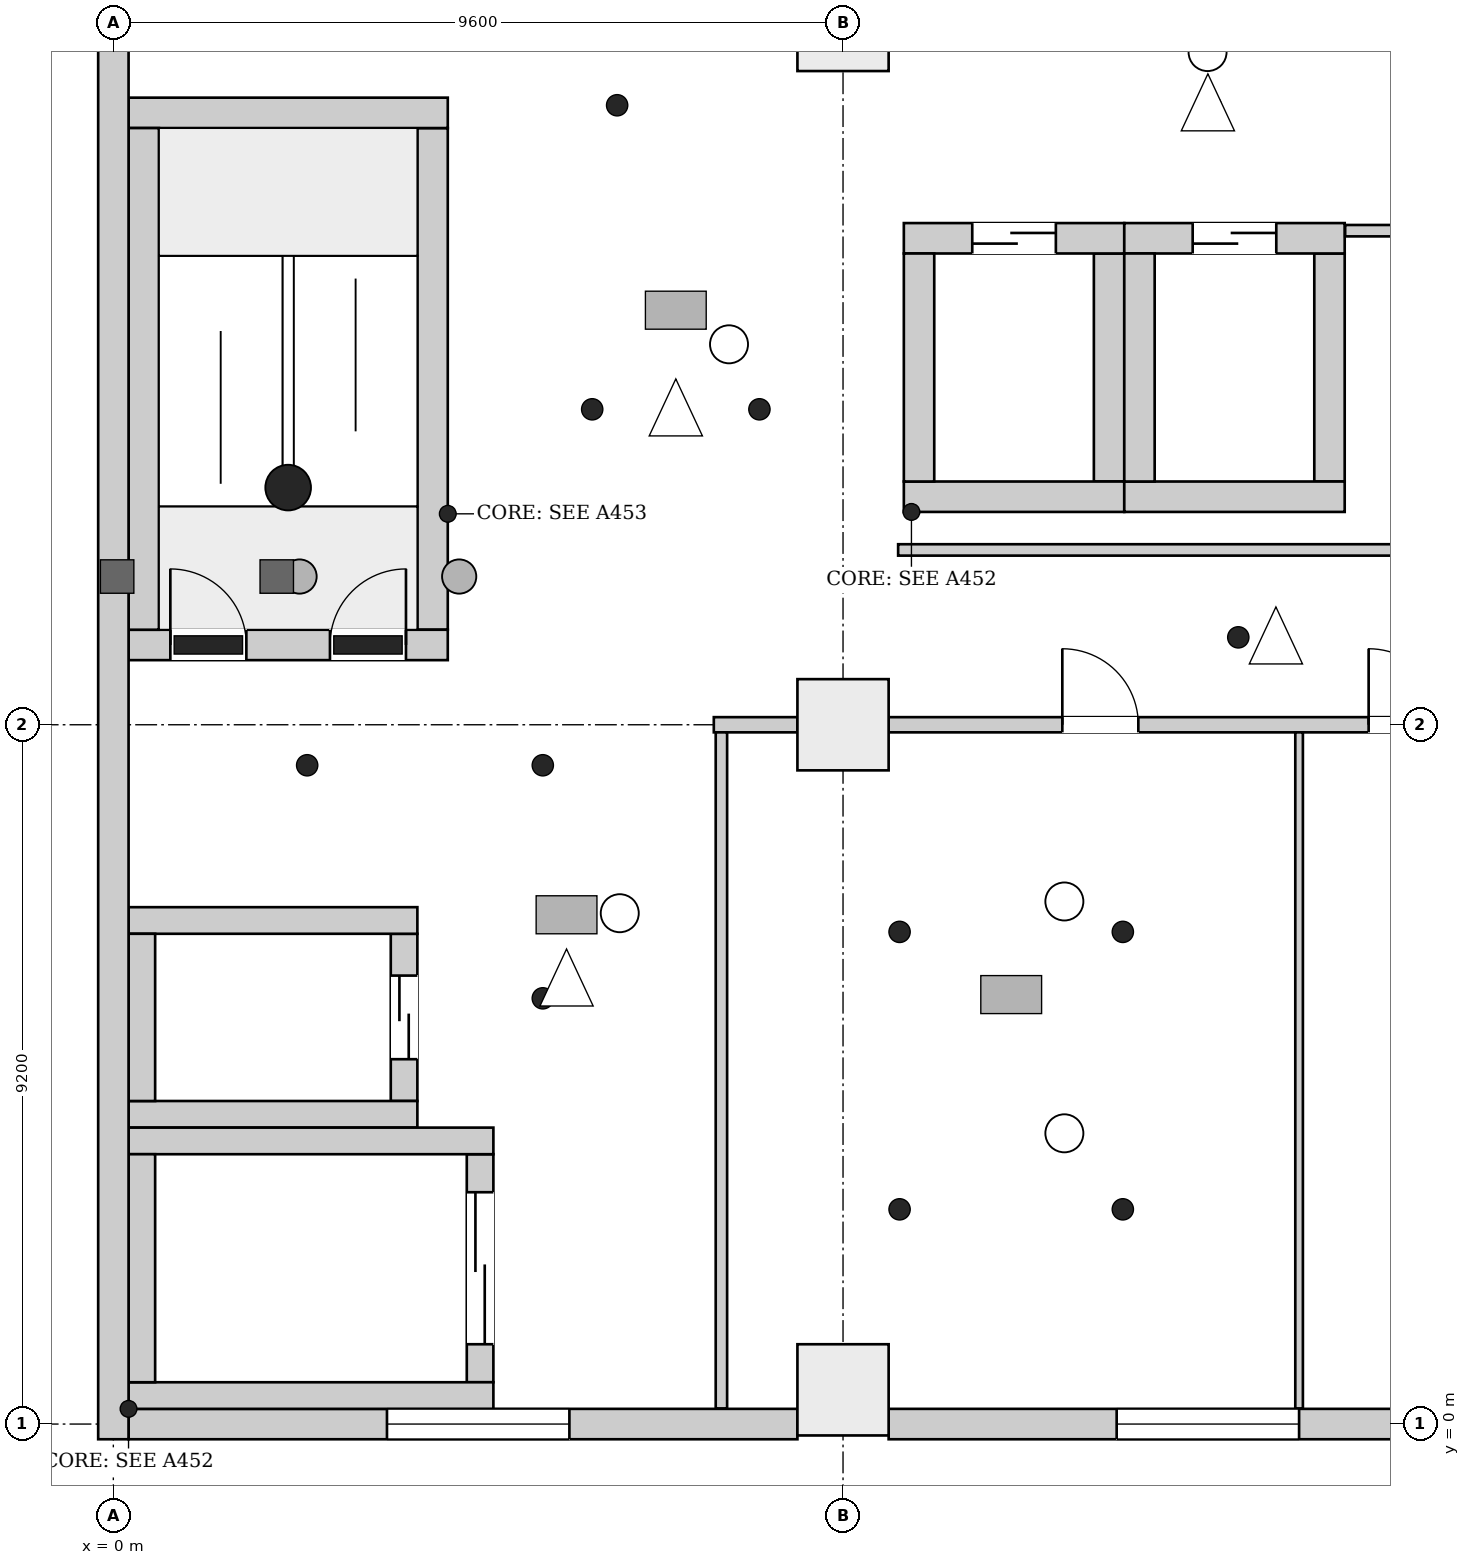
"""IFC4 building model, lengths in metres.
Left out: names, types, materials, properties, quantities, classifications, styles, units other than length and angle.
Written with IfcOpenShell. Run it as: python <this file> out.ifc"""

import sys

from ifc_helpers import new_model, si_unit, direction, frame, frame_2d, origin, origin_2d, place, context, subcontext, project, spatial, rectangle, extrude, element, fill, save


model = new_model("IFC4")
c1 = context("Model", 3, precision=1e-05, world=origin(), true_north=direction((0.0, 1.0)))
c2 = subcontext(c1, "Body", "Model", "MODEL_VIEW")
j1 = project(units=[si_unit("LENGTHUNIT", "METRE"), si_unit("PLANEANGLEUNIT", "RADIAN")], contexts=[c1])
p1 = place(None, origin())
s1 = spatial("IfcSite", under=j1, at=p1, CompositionType="ELEMENT")
p2 = place(p1, origin())
s2 = spatial("IfcBuilding", under=s1, at=p2, CompositionType="ELEMENT")
p3 = place(p2, frame((0.0, 0.0, 14.2)))
s3 = spatial("IfcBuildingStorey", under=s2, at=p3, CompositionType="ELEMENT", Elevation=14.2)
p4 = place(p3, frame((0.0, -0.2, 0.0), z_axis=(0.0, 0.0, 1.0), x_axis=(0.0, 1.0, 0.0)))
e1 = element("IfcWall", 1, at=p4, inside=s3, PredefinedType="SHEAR", context=c2, shape_type="SweptSolid", body=[
    extrude(rectangle(XDim=46.88, YDim=0.4, at=frame_2d((23.44, 0.0))), origin(), (0.0, 0.0, 1.0), 7.5),
])
p5 = place(p3, frame((0.2, 10.25, 0.0), z_axis=(0.0, 0.0, 1.0), x_axis=(1.0, 0.0, 0.0)))
e2 = element("IfcWall", 2, at=p5, inside=s3, PredefinedType="SHEAR", context=c2, shape_type="SweptSolid", body=[
    extrude(rectangle(XDim=4.2, YDim=0.4, at=frame_2d((2.1, 0.0))), origin(), (0.0, 0.0, 1.0), 7.5),
])
p6 = place(p5, frame((0.55, 0.0, 0.0)))
e3 = element("IfcOpeningElement", 3, at=p6, cuts=e2, PredefinedType="OPENING", context=c2, shape_type="SweptSolid", body=[
    extrude(rectangle(XDim=1.0, YDim=2.1, at=frame_2d((0.5, 1.05))), frame((0.0, 0.21, 0.0), z_axis=(0.0, -1.0, 0.0), x_axis=(1.0, 0.0, 0.0)), (0.0, 0.0, 1.0), 0.42),
])
p7 = place(p5, frame((2.65, 0.0, 0.0)))
e4 = element("IfcOpeningElement", 4, at=p7, cuts=e2, PredefinedType="OPENING", context=c2, shape_type="SweptSolid", body=[
    extrude(rectangle(XDim=1.0, YDim=2.1, at=frame_2d((0.5, 1.05))), frame((0.0, 0.21, 0.0), z_axis=(0.0, -1.0, 0.0), x_axis=(1.0, 0.0, 0.0)), (0.0, 0.0, 1.0), 0.42),
])
p8 = place(p3, frame((0.2, 17.25, 0.0), z_axis=(0.0, 0.0, 1.0), x_axis=(1.0, 0.0, 0.0)))
e5 = element("IfcWall", 5, at=p8, inside=s3, PredefinedType="SHEAR", context=c2, shape_type="SweptSolid", body=[
    extrude(rectangle(XDim=4.2, YDim=0.4, at=frame_2d((2.1, 0.0))), origin(), (0.0, 0.0, 1.0), 7.5),
])
for number, where, z_axis, x_axis in (
    (6, (0.4, 10.45, 0.0), (0.0, 0.0, 1.0), (0.0, 1.0, 0.0)),
    (7, (4.2, 10.45, 0.0), (0.0, 0.0, 1.0), (0.0, 1.0, 0.0)),
):
    element("IfcWall", number, at=place(p3, frame(where, z_axis=z_axis, x_axis=x_axis)), inside=s3, PredefinedType="SHEAR", context=c2, shape_type="SweptSolid", body=[
        extrude(rectangle(XDim=6.6, YDim=0.4, at=frame_2d((3.3, 0.0))), origin(), (0.0, 0.0, 1.0), 7.5),
    ])
for number, where, z_axis, x_axis in (
    (8, (0.2, 0.375, 0.0), (0.0, 0.0, 1.0), (1.0, 0.0, 0.0)),
    (9, (0.2, 3.725, 0.0), (0.0, 0.0, 1.0), (1.0, 0.0, 0.0)),
):
    element("IfcWall", number, at=place(p3, frame(where, z_axis=z_axis, x_axis=x_axis)), inside=s3, PredefinedType="SHEAR", context=c2, shape_type="SweptSolid", body=[
        extrude(rectangle(XDim=4.8, YDim=0.35, at=frame_2d((2.4, 0.0))), origin(), (0.0, 0.0, 1.0), 7.5),
    ])
p9 = place(p3, frame((0.375, 0.55, 0.0), z_axis=(0.0, 0.0, 1.0), x_axis=(0.0, 1.0, 0.0)))
e10 = element("IfcWall", 10, at=p9, inside=s3, PredefinedType="SHEAR", context=c2, shape_type="SweptSolid", body=[
    extrude(rectangle(XDim=3.0, YDim=0.35, at=frame_2d((1.5, 0.0))), origin(), (0.0, 0.0, 1.0), 7.5),
])
p10 = place(p3, frame((4.825, 0.55, 0.0), z_axis=(0.0, 0.0, 1.0), x_axis=(0.0, 1.0, 0.0)))
e11 = element("IfcWall", 11, at=p10, inside=s3, PredefinedType="SHEAR", context=c2, shape_type="SweptSolid", body=[
    extrude(rectangle(XDim=3.0, YDim=0.35, at=frame_2d((1.5, 0.0))), origin(), (0.0, 0.0, 1.0), 7.5),
])
p11 = place(p10, frame((0.5, 0.0, 0.0)))
e12 = element("IfcOpeningElement", 12, at=p11, cuts=e11, PredefinedType="OPENING", context=c2, shape_type="SweptSolid", body=[
    extrude(rectangle(XDim=2.0, YDim=2.4, at=frame_2d((1.0, 1.2))), frame((0.0, 0.185, 0.0), z_axis=(0.0, -1.0, 0.0), x_axis=(1.0, 0.0, 0.0)), (0.0, 0.0, 1.0), 0.37),
])
for number, where, z_axis, x_axis in (
    (13, (0.2, 4.075, 0.0), (0.0, 0.0, 1.0), (1.0, 0.0, 0.0)),
    (14, (0.2, 6.625, 0.0), (0.0, 0.0, 1.0), (1.0, 0.0, 0.0)),
):
    element("IfcWall", number, at=place(p3, frame(where, z_axis=z_axis, x_axis=x_axis)), inside=s3, PredefinedType="SHEAR", context=c2, shape_type="SweptSolid", body=[
        extrude(rectangle(XDim=3.8, YDim=0.35, at=frame_2d((1.9, 0.0))), origin(), (0.0, 0.0, 1.0), 7.5),
    ])
p12 = place(p3, frame((0.375, 4.25, 0.0), z_axis=(0.0, 0.0, 1.0), x_axis=(0.0, 1.0, 0.0)))
e15 = element("IfcWall", 15, at=p12, inside=s3, PredefinedType="SHEAR", context=c2, shape_type="SweptSolid", body=[
    extrude(rectangle(XDim=2.2, YDim=0.35, at=frame_2d((1.1, 0.0))), origin(), (0.0, 0.0, 1.0), 7.5),
])
p13 = place(p3, frame((3.825, 4.25, 0.0), z_axis=(0.0, 0.0, 1.0), x_axis=(0.0, 1.0, 0.0)))
e16 = element("IfcWall", 16, at=p13, inside=s3, PredefinedType="SHEAR", context=c2, shape_type="SweptSolid", body=[
    extrude(rectangle(XDim=2.2, YDim=0.35, at=frame_2d((1.1, 0.0))), origin(), (0.0, 0.0, 1.0), 7.5),
])
p14 = place(p13, frame((0.55, 0.0, 0.0)))
e17 = element("IfcOpeningElement", 17, at=p14, cuts=e16, PredefinedType="OPENING", context=c2, shape_type="SweptSolid", body=[
    extrude(rectangle(XDim=1.1, YDim=2.1, at=frame_2d((0.55, 1.05))), frame((0.0, 0.185, 0.0), z_axis=(0.0, -1.0, 0.0), x_axis=(1.0, 0.0, 0.0)), (0.0, 0.0, 1.0), 0.37),
])
p15 = place(p3, frame((10.4, 12.2, 0.0), z_axis=(0.0, 0.0, 1.0), x_axis=(1.0, 0.0, 0.0)))
e18 = element("IfcWall", 18, at=p15, inside=s3, PredefinedType="SHEAR", context=c2, shape_type="SweptSolid", body=[
    extrude(rectangle(XDim=2.9, YDim=0.4, at=frame_2d((1.45, 0.0))), origin(), (0.0, 0.0, 1.0), 7.5),
])
p16 = place(p3, frame((10.4, 15.6, 0.0), z_axis=(0.0, 0.0, 1.0), x_axis=(1.0, 0.0, 0.0)))
e19 = element("IfcWall", 19, at=p16, inside=s3, PredefinedType="SHEAR", context=c2, shape_type="SweptSolid", body=[
    extrude(rectangle(XDim=2.9, YDim=0.4, at=frame_2d((1.45, 0.0))), origin(), (0.0, 0.0, 1.0), 7.5),
])
p17 = place(p16, frame((0.9, 0.0, 0.0)))
e20 = element("IfcOpeningElement", 20, at=p17, cuts=e19, PredefinedType="OPENING", context=c2, shape_type="SweptSolid", body=[
    extrude(rectangle(XDim=1.1, YDim=2.1, at=frame_2d((0.55, 1.05))), frame((0.0, 0.21, 0.0), z_axis=(0.0, -1.0, 0.0), x_axis=(1.0, 0.0, 0.0)), (0.0, 0.0, 1.0), 0.42),
])
for number, where, z_axis, x_axis in (
    (21, (10.6, 12.4, 0.0), (0.0, 0.0, 1.0), (0.0, 1.0, 0.0)),
    (22, (13.1, 12.4, 0.0), (0.0, 0.0, 1.0), (0.0, 1.0, 0.0)),
):
    element("IfcWall", number, at=place(p3, frame(where, z_axis=z_axis, x_axis=x_axis)), inside=s3, PredefinedType="SHEAR", context=c2, shape_type="SweptSolid", body=[
        extrude(rectangle(XDim=3.0, YDim=0.4, at=frame_2d((1.5, 0.0))), origin(), (0.0, 0.0, 1.0), 7.5),
    ])
p18 = place(p3, frame((13.3, 12.2, 0.0), z_axis=(0.0, 0.0, 1.0), x_axis=(1.0, 0.0, 0.0)))
e23 = element("IfcWall", 23, at=p18, inside=s3, PredefinedType="SHEAR", context=c2, shape_type="SweptSolid", body=[
    extrude(rectangle(XDim=2.9, YDim=0.4, at=frame_2d((1.45, 0.0))), origin(), (0.0, 0.0, 1.0), 7.5),
])
p19 = place(p3, frame((13.3, 15.6, 0.0), z_axis=(0.0, 0.0, 1.0), x_axis=(1.0, 0.0, 0.0)))
e24 = element("IfcWall", 24, at=p19, inside=s3, PredefinedType="SHEAR", context=c2, shape_type="SweptSolid", body=[
    extrude(rectangle(XDim=2.9, YDim=0.4, at=frame_2d((1.45, 0.0))), origin(), (0.0, 0.0, 1.0), 7.5),
])
p20 = place(p19, frame((0.9, 0.0, 0.0)))
e25 = element("IfcOpeningElement", 25, at=p20, cuts=e24, PredefinedType="OPENING", context=c2, shape_type="SweptSolid", body=[
    extrude(rectangle(XDim=1.1, YDim=2.1, at=frame_2d((0.55, 1.05))), frame((0.0, 0.21, 0.0), z_axis=(0.0, -1.0, 0.0), x_axis=(1.0, 0.0, 0.0)), (0.0, 0.0, 1.0), 0.42),
])
for number, where, z_axis, x_axis in (
    (26, (13.5, 12.4, 0.0), (0.0, 0.0, 1.0), (0.0, 1.0, 0.0)),
    (27, (16.0, 12.4, 0.0), (0.0, 0.0, 1.0), (0.0, 1.0, 0.0)),
):
    element("IfcWall", number, at=place(p3, frame(where, z_axis=z_axis, x_axis=x_axis)), inside=s3, PredefinedType="SHEAR", context=c2, shape_type="SweptSolid", body=[
        extrude(rectangle(XDim=3.0, YDim=0.4, at=frame_2d((1.5, 0.0))), origin(), (0.0, 0.0, 1.0), 7.5),
    ])
for number, where, z_axis, x_axis in (
    (28, (9.6, 0.45, 0.0), (0.0, 0.0, 1.0), (1.0, 0.0, 0.0)),
    (29, (9.6, 9.2, 0.0), (0.0, 0.0, 1.0), (1.0, 0.0, 0.0)),
    (30, (9.6, 18.4, 0.0), (0.0, 0.0, 1.0), (1.0, 0.0, 0.0)),
):
    element("IfcColumn", number, at=place(p3, frame(where, z_axis=z_axis, x_axis=x_axis)), inside=s3, PredefinedType="COLUMN", context=c2, shape_type="SweptSolid", body=[
        extrude(rectangle(XDim=1.2, YDim=1.2, at=origin_2d()), origin(), (0.0, 0.0, 1.0), 7.5),
    ])
p21 = place(p3, frame((0.2, 0.0, 0.0), z_axis=(0.0, 0.0, 1.0), x_axis=(1.0, 0.0, 0.0)))
e31 = element("IfcWall", 31, at=p21, inside=s3, PredefinedType="ELEMENTEDWALL", context=c2, shape_type="SweptSolid", body=[
    extrude(rectangle(XDim=8.8, YDim=0.4, at=frame_2d((4.4, 0.0))), origin(), (0.0, 0.0, 1.0), 7.15),
])
p22 = place(p21, frame((3.4, 0.0, 1.0)))
e32 = element("IfcOpeningElement", 32, at=p22, cuts=e31, PredefinedType="OPENING", context=c2, shape_type="SweptSolid", body=[
    extrude(rectangle(XDim=2.4, YDim=2.2, at=frame_2d((1.2, 1.1))), frame((0.0, 0.21, 0.0), z_axis=(0.0, -1.0, 0.0), x_axis=(1.0, 0.0, 0.0)), (0.0, 0.0, 1.0), 0.42),
])
p23 = place(p3, frame((10.2, 0.0, 0.0), z_axis=(0.0, 0.0, 1.0), x_axis=(1.0, 0.0, 0.0)))
e33 = element("IfcWall", 33, at=p23, inside=s3, PredefinedType="ELEMENTEDWALL", context=c2, shape_type="SweptSolid", body=[
    extrude(rectangle(XDim=8.4, YDim=0.4, at=frame_2d((4.2, 0.0))), origin(), (0.0, 0.0, 1.0), 7.15),
])
p24 = place(p23, frame((3.0, 0.0, 1.0)))
e34 = element("IfcOpeningElement", 34, at=p24, cuts=e33, PredefinedType="OPENING", context=c2, shape_type="SweptSolid", body=[
    extrude(rectangle(XDim=2.4, YDim=2.2, at=frame_2d((1.2, 1.1))), frame((0.0, 0.21, 0.0), z_axis=(0.0, -1.0, 0.0), x_axis=(1.0, 0.0, 0.0)), (0.0, 0.0, 1.0), 0.42),
])
p25 = place(p3, frame((7.9, 9.2, 0.0), z_axis=(0.0, 0.0, 1.0), x_axis=(1.0, 0.0, 0.0)))
e35 = element("IfcWall", 35, at=p25, inside=s3, PredefinedType="PARTITIONING", context=c2, shape_type="SweptSolid", body=[
    extrude(rectangle(XDim=1.1, YDim=0.2, at=frame_2d((0.55, 0.0))), origin(), (0.0, 0.0, 1.0), 6.75),
])
p26 = place(p3, frame((8.0, 0.206, 0.0), z_axis=(0.0, 0.0, 1.0), x_axis=(0.0, 1.0, 0.0)))
e36 = element("IfcWall", 36, at=p26, inside=s3, PredefinedType="PARTITIONING", context=c2, shape_type="SweptSolid", body=[
    extrude(rectangle(XDim=8.894, YDim=0.15, at=frame_2d((4.447, 0.0))), origin(), (0.0, 0.0, 1.0), 7.15),
])
p27 = place(p3, frame((10.2, 9.2, 0.0), z_axis=(0.0, 0.0, 1.0), x_axis=(1.0, 0.0, 0.0)))
e37 = element("IfcWall", 37, at=p27, inside=s3, PredefinedType="PARTITIONING", context=c2, shape_type="SweptSolid", body=[
    extrude(rectangle(XDim=8.4, YDim=0.2, at=frame_2d((4.2, 0.0))), origin(), (0.0, 0.0, 1.0), 6.75),
])
p28 = place(p27, frame((2.285, 0.0, 0.0)))
e38 = element("IfcOpeningElement", 38, at=p28, cuts=e37, PredefinedType="OPENING", context=c2, shape_type="SweptSolid", body=[
    extrude(rectangle(XDim=1.0, YDim=2.1, at=frame_2d((0.5, 1.05))), frame((0.0, 0.11, 0.0), z_axis=(0.0, -1.0, 0.0), x_axis=(1.0, 0.0, 0.0)), (0.0, 0.0, 1.0), 0.22),
])
p29 = place(p27, frame((6.315, 0.0, 0.0)))
e39 = element("IfcOpeningElement", 39, at=p29, cuts=e37, PredefinedType="OPENING", context=c2, shape_type="SweptSolid", body=[
    extrude(rectangle(XDim=1.0, YDim=2.1, at=frame_2d((0.5, 1.05))), frame((0.0, 0.11, 0.0), z_axis=(0.0, -1.0, 0.0), x_axis=(1.0, 0.0, 0.0)), (0.0, 0.0, 1.0), 0.22),
])
p30 = place(p3, frame((10.325, 11.5, 0.0), z_axis=(0.0, 0.0, 1.0), x_axis=(1.0, 0.0, 0.0)))
e40 = element("IfcWall", 40, at=p30, inside=s3, PredefinedType="PARTITIONING", context=c2, shape_type="SweptSolid", body=[
    extrude(rectangle(XDim=9.569, YDim=0.15, at=frame_2d((4.785, 0.0))), origin(), (0.0, 0.0, 1.0), 7.15),
])
p31 = place(p3, frame((15.6, 0.206, 0.0), z_axis=(0.0, 0.0, 1.0), x_axis=(0.0, 1.0, 0.0)))
e41 = element("IfcWall", 41, at=p31, inside=s3, PredefinedType="PARTITIONING", context=c2, shape_type="SweptSolid", body=[
    extrude(rectangle(XDim=8.894, YDim=0.1, at=frame_2d((4.447, 0.0))), origin(), (0.0, 0.0, 1.0), 7.15),
])
p32 = place(p3, frame((16.206, 15.7, 0.0), z_axis=(0.0, 0.0, 1.0), x_axis=(1.0, 0.0, 0.0)))
e42 = element("IfcWall", 42, at=p32, inside=s3, PredefinedType="PARTITIONING", context=c2, shape_type="SweptSolid", body=[
    extrude(rectangle(XDim=3.688, YDim=0.15, at=frame_2d((1.844, 0.0))), origin(), (0.0, 0.0, 1.0), 7.15),
])
p33 = place(p22, origin())
e43 = element("IfcWindow", 43, at=p33, inside=s3, PartitioningType="SINGLE_PANEL", PredefinedType="WINDOW", context=c2, shape_type="SweptSolid", body=[
    extrude(rectangle(XDim=2.4, YDim=2.2, at=frame_2d((1.2, 1.1))), frame((0.0, 0.03, 0.0), z_axis=(0.0, -1.0, 0.0), x_axis=(1.0, 0.0, 0.0)), (0.0, 0.0, 1.0), 0.06),
])
fill(e32, e43)
p34 = place(p24, origin())
e44 = element("IfcWindow", 44, at=p34, inside=s3, PartitioningType="SINGLE_PANEL", PredefinedType="WINDOW", context=c2, shape_type="SweptSolid", body=[
    extrude(rectangle(XDim=2.4, YDim=2.2, at=frame_2d((1.2, 1.1))), frame((0.0, 0.03, 0.0), z_axis=(0.0, -1.0, 0.0), x_axis=(1.0, 0.0, 0.0)), (0.0, 0.0, 1.0), 0.06),
])
fill(e34, e44)
p35 = place(p6, origin())
e45 = element("IfcDoor", 45, at=p35, inside=s3, OperationType="SINGLE_SWING_RIGHT", PredefinedType="DOOR", context=c2, shape_type="SweptSolid", body=[
    extrude(rectangle(XDim=1.0, YDim=2.1, at=frame_2d((0.5, 1.05))), frame((0.0, 0.025, 0.0), z_axis=(0.0, -1.0, 0.0), x_axis=(1.0, 0.0, 0.0)), (0.0, 0.0, 1.0), 0.05),
])
fill(e3, e45)
p36 = place(p7, origin())
e46 = element("IfcDoor", 46, at=p36, inside=s3, OperationType="SINGLE_SWING_LEFT", PredefinedType="DOOR", context=c2, shape_type="SweptSolid", body=[
    extrude(rectangle(XDim=1.0, YDim=2.1, at=frame_2d((0.5, 1.05))), frame((0.0, 0.025, 0.0), z_axis=(0.0, -1.0, 0.0), x_axis=(1.0, 0.0, 0.0)), (0.0, 0.0, 1.0), 0.05),
])
fill(e4, e46)
p37 = place(p11, origin())
e47 = element("IfcDoor", 47, at=p37, inside=s3, OperationType="DOUBLE_DOOR_SLIDING", PredefinedType="DOOR", context=c2, shape_type="SweptSolid", body=[
    extrude(rectangle(XDim=2.0, YDim=2.4, at=frame_2d((1.0, 1.2))), frame((0.0, 0.025, 0.0), z_axis=(0.0, -1.0, 0.0), x_axis=(1.0, 0.0, 0.0)), (0.0, 0.0, 1.0), 0.05),
])
fill(e12, e47)
p38 = place(p14, origin())
e48 = element("IfcDoor", 48, at=p38, inside=s3, OperationType="DOUBLE_DOOR_SLIDING", PredefinedType="DOOR", context=c2, shape_type="SweptSolid", body=[
    extrude(rectangle(XDim=1.1, YDim=2.1, at=frame_2d((0.55, 1.05))), frame((0.0, 0.025, 0.0), z_axis=(0.0, -1.0, 0.0), x_axis=(1.0, 0.0, 0.0)), (0.0, 0.0, 1.0), 0.05),
])
fill(e17, e48)
p39 = place(p17, origin())
e49 = element("IfcDoor", 49, at=p39, inside=s3, OperationType="DOUBLE_DOOR_SLIDING", PredefinedType="DOOR", context=c2, shape_type="SweptSolid", body=[
    extrude(rectangle(XDim=1.1, YDim=2.1, at=frame_2d((0.55, 1.05))), frame((0.0, 0.025, 0.0), z_axis=(0.0, -1.0, 0.0), x_axis=(1.0, 0.0, 0.0)), (0.0, 0.0, 1.0), 0.05),
])
fill(e20, e49)
p40 = place(p20, origin())
e50 = element("IfcDoor", 50, at=p40, inside=s3, OperationType="DOUBLE_DOOR_SLIDING", PredefinedType="DOOR", context=c2, shape_type="SweptSolid", body=[
    extrude(rectangle(XDim=1.1, YDim=2.1, at=frame_2d((0.55, 1.05))), frame((0.0, 0.025, 0.0), z_axis=(0.0, -1.0, 0.0), x_axis=(1.0, 0.0, 0.0)), (0.0, 0.0, 1.0), 0.05),
])
fill(e25, e50)
p41 = place(p28, origin())
e51 = element("IfcDoor", 51, at=p41, inside=s3, OperationType="SINGLE_SWING_RIGHT", PredefinedType="DOOR", context=c2, shape_type="SweptSolid", body=[
    extrude(rectangle(XDim=1.0, YDim=2.1, at=frame_2d((0.5, 1.05))), frame((0.0, 0.025, 0.0), z_axis=(0.0, -1.0, 0.0), x_axis=(1.0, 0.0, 0.0)), (0.0, 0.0, 1.0), 0.05),
])
fill(e38, e51)
p42 = place(p29, origin())
e52 = element("IfcDoor", 52, at=p42, inside=s3, OperationType="SINGLE_SWING_LEFT", PredefinedType="DOOR", context=c2, shape_type="SweptSolid", body=[
    extrude(rectangle(XDim=1.0, YDim=2.1, at=frame_2d((0.5, 1.05))), frame((0.0, 0.025, 0.0), z_axis=(0.0, -1.0, 0.0), x_axis=(1.0, 0.0, 0.0)), (0.0, 0.0, 1.0), 0.05),
])
fill(e39, e52)
save(model, sys.argv[1])
